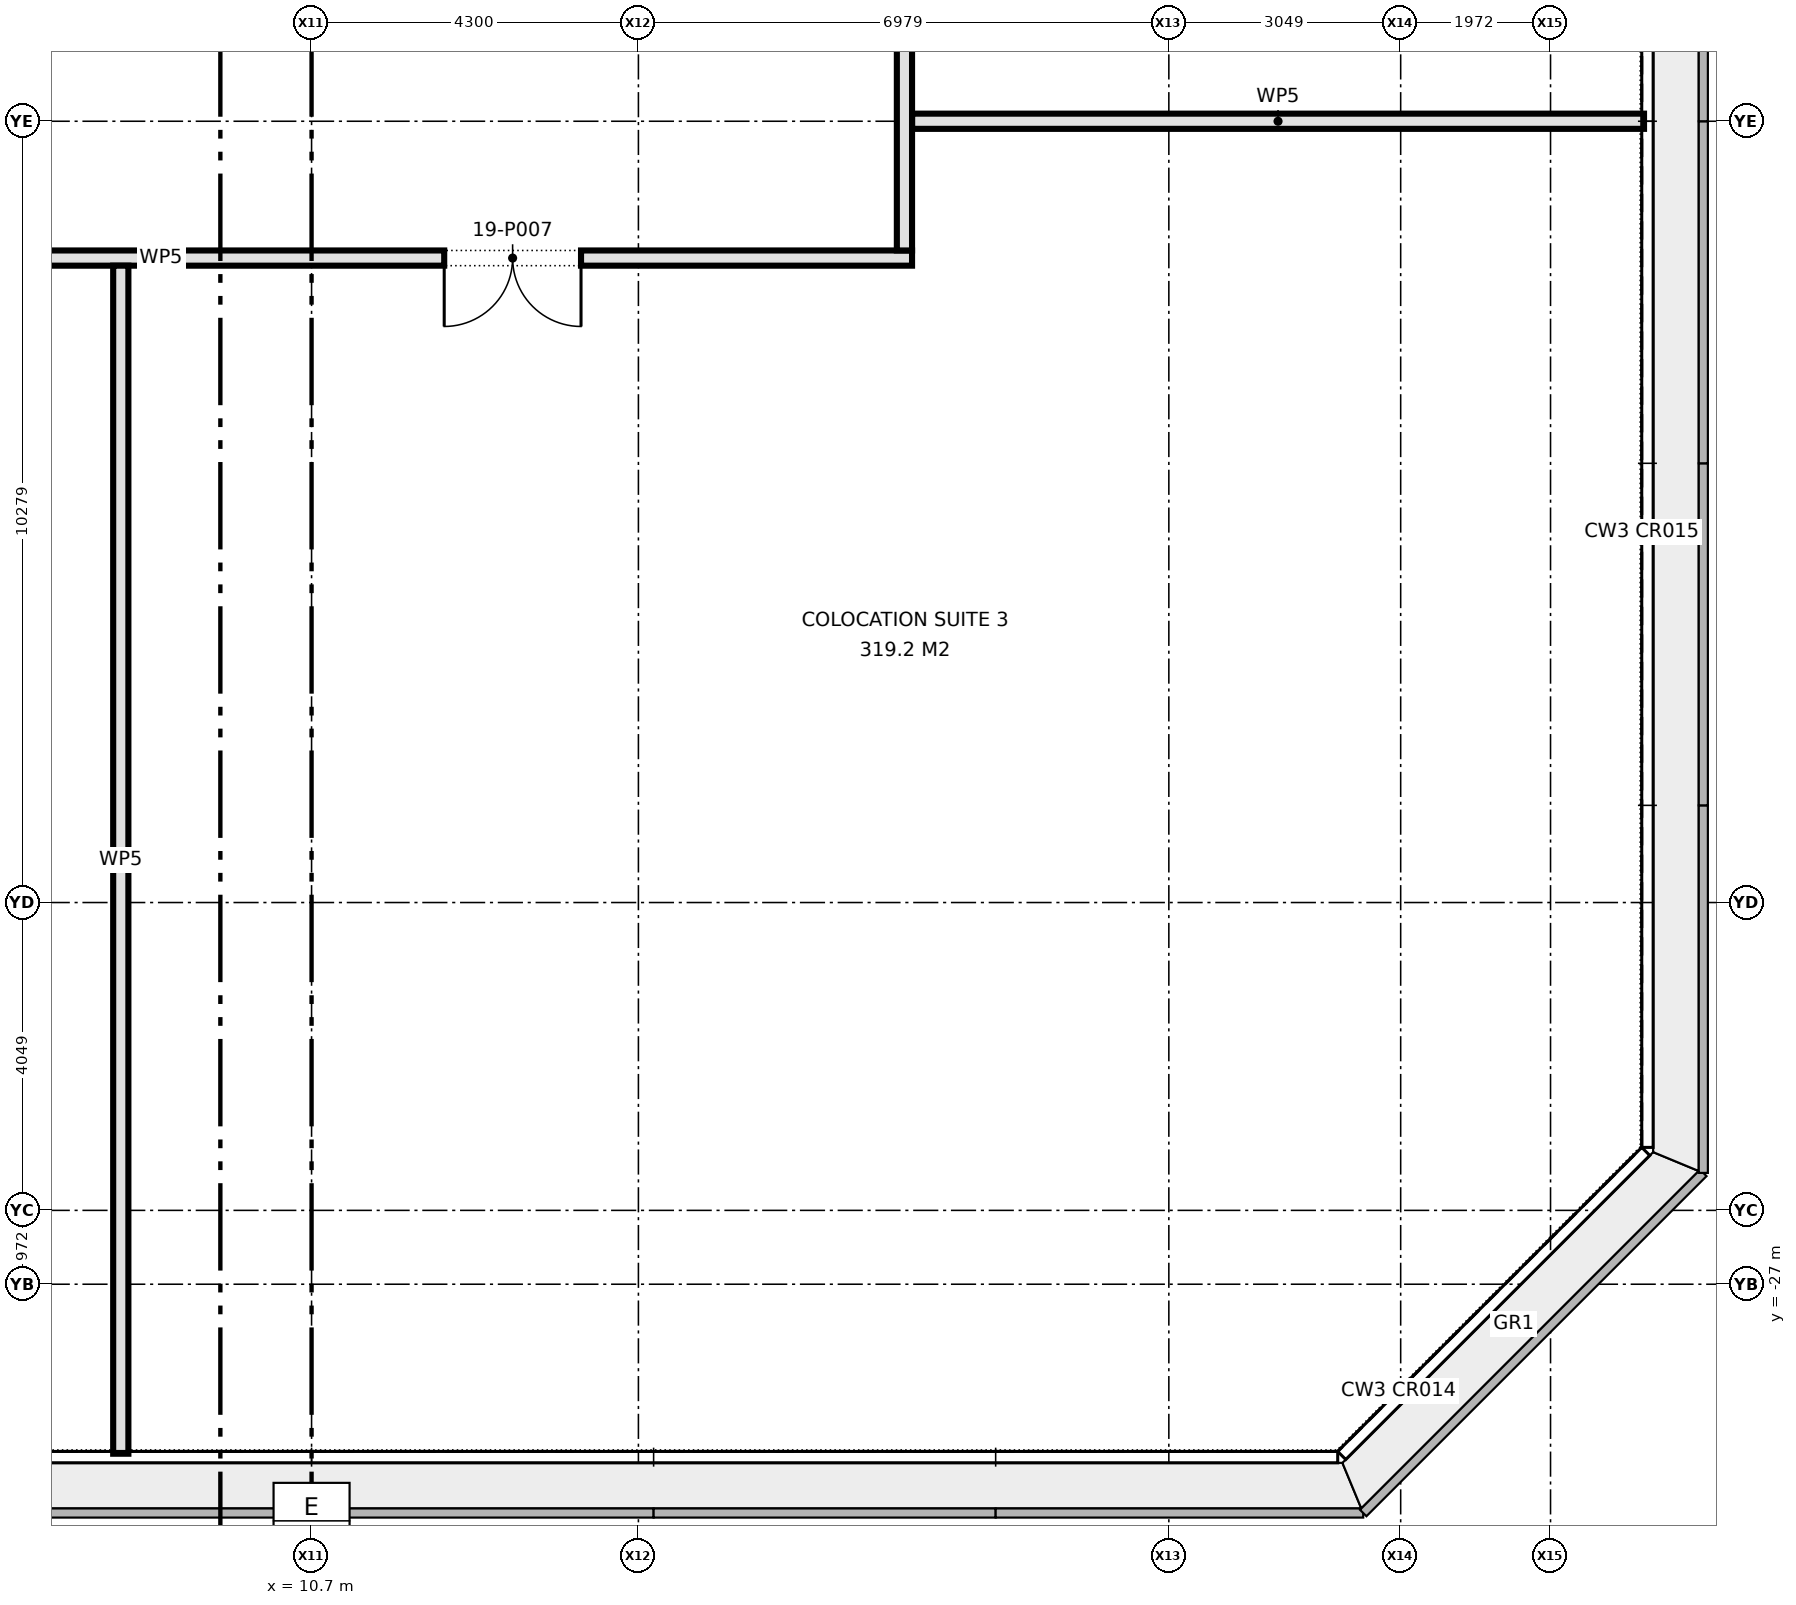
"""IFC4 building model, lengths in metres.
Left out: names, types, materials, properties, quantities, classifications, styles, units other than length and angle.
Written with IfcOpenShell. Run it as: python <this file> out.ifc"""

import sys

from ifc_helpers import new_model, si_unit, direction, frame, frame_2d, origin, place, context, subcontext, project, spatial, rectangle, extrude, element, fill, save


model = new_model("IFC4")
c1 = context("Model", 3, precision=1e-05, world=origin(), true_north=direction((0.0, 1.0)))
c2 = subcontext(c1, "Body", "Model", "MODEL_VIEW")
j1 = project(units=[si_unit("LENGTHUNIT", "METRE"), si_unit("PLANEANGLEUNIT", "RADIAN")], contexts=[c1])
p1 = place(None, origin())
s1 = spatial("IfcSite", under=j1, at=p1, CompositionType="ELEMENT")
p2 = place(p1, origin())
s2 = spatial("IfcBuilding", under=s1, at=p2, CompositionType="ELEMENT")
p3 = place(p2, frame((0.0, 0.0, 86.4)))
s3 = spatial("IfcBuildingStorey", under=s2, at=p3, CompositionType="ELEMENT", Elevation=86.4)
p4 = place(p3, frame((-18.6, -13.5, 0.0), z_axis=(0.0, 0.0, 1.0), x_axis=(1.0, 0.0, 0.0)))
e1 = element("IfcWall", 1, at=p4, inside=s3, PredefinedType="PARTITIONING", context=c2, shape_type="SweptSolid", body=[
    extrude(rectangle(XDim=37.2, YDim=0.2, at=frame_2d((18.6, 0.0))), origin(), (0.0, 0.0, 1.0), 4.2),
])
p5 = place(p4, frame((2.55, 0.0, 0.0)))
e2 = element("IfcOpeningElement", 2, at=p5, cuts=e1, PredefinedType="OPENING", context=c2, shape_type="SweptSolid", body=[
    extrude(rectangle(XDim=1.8, YDim=2.1, at=frame_2d((0.9, 1.05))), frame((0.0, 0.11, 0.0), z_axis=(0.0, -1.0, 0.0), x_axis=(1.0, 0.0, 0.0)), (0.0, 0.0, 1.0), 0.22),
])
p6 = place(p4, frame((21.795, 0.0, 0.0)))
e3 = element("IfcOpeningElement", 3, at=p6, cuts=e1, PredefinedType="OPENING", context=c2, shape_type="SweptSolid", body=[
    extrude(rectangle(XDim=1.8, YDim=2.1, at=frame_2d((0.9, 1.05))), frame((0.0, 0.11, 0.0), z_axis=(0.0, -1.0, 0.0), x_axis=(1.0, 0.0, 0.0)), (0.0, 0.0, 1.0), 0.22),
])
p7 = place(p4, frame((31.045, 0.0, 0.0)))
e4 = element("IfcOpeningElement", 4, at=p7, cuts=e1, PredefinedType="OPENING", context=c2, shape_type="SweptSolid", body=[
    extrude(rectangle(XDim=1.8, YDim=2.1, at=frame_2d((0.9, 1.05))), frame((0.0, 0.11, 0.0), z_axis=(0.0, -1.0, 0.0), x_axis=(1.0, 0.0, 0.0)), (0.0, 0.0, 1.0), 0.22),
])
p8 = place(p4, frame((8.0, 0.0, 0.0)))
e5 = element("IfcOpeningElement", 5, at=p8, cuts=e1, PredefinedType="OPENING", context=c2, shape_type="SweptSolid", body=[
    extrude(rectangle(XDim=1.2, YDim=2.1, at=frame_2d((0.6, 1.05))), frame((0.0, 0.11, 0.0), z_axis=(0.0, -1.0, 0.0), x_axis=(1.0, 0.0, 0.0)), (0.0, 0.0, 1.0), 0.22),
])
p9 = place(p4, frame((11.4, 0.0, 0.0)))
e6 = element("IfcOpeningElement", 6, at=p9, cuts=e1, PredefinedType="OPENING", context=c2, shape_type="SweptSolid", body=[
    extrude(rectangle(XDim=1.0, YDim=2.1, at=frame_2d((0.5, 1.05))), frame((0.0, 0.11, 0.0), z_axis=(0.0, -1.0, 0.0), x_axis=(1.0, 0.0, 0.0)), (0.0, 0.0, 1.0), 0.22),
])
p10 = place(p4, frame((14.4, 0.0, 0.0)))
e7 = element("IfcOpeningElement", 7, at=p10, cuts=e1, PredefinedType="OPENING", context=c2, shape_type="SweptSolid", body=[
    extrude(rectangle(XDim=1.0, YDim=2.1, at=frame_2d((0.5, 1.05))), frame((0.0, 0.11, 0.0), z_axis=(0.0, -1.0, 0.0), x_axis=(1.0, 0.0, 0.0)), (0.0, 0.0, 1.0), 0.22),
])
p11 = place(p4, frame((17.0, 0.0, 0.0)))
e8 = element("IfcOpeningElement", 8, at=p11, cuts=e1, PredefinedType="OPENING", context=c2, shape_type="SweptSolid", body=[
    extrude(rectangle(XDim=1.0, YDim=2.1, at=frame_2d((0.5, 1.05))), frame((0.0, 0.11, 0.0), z_axis=(0.0, -1.0, 0.0), x_axis=(1.0, 0.0, 0.0)), (0.0, 0.0, 1.0), 0.22),
])
p12 = place(p3, frame((18.6, -11.7, 0.0), z_axis=(0.0, 0.0, 1.0), x_axis=(1.0, 0.0, 0.0)))
e9 = element("IfcWall", 9, at=p12, inside=s3, PredefinedType="PARTITIONING", context=c2, shape_type="SweptSolid", body=[
    extrude(rectangle(XDim=9.63, YDim=0.2, at=frame_2d((4.815, 0.0))), origin(), (0.0, 0.0, 1.0), 4.2),
])
p13 = place(p3, frame((18.5, -13.4, 0.0), z_axis=(0.0, 0.0, 1.0), x_axis=(0.0, 1.0, 0.0)))
e10 = element("IfcWall", 10, at=p13, inside=s3, PredefinedType="PARTITIONING", context=c2, shape_type="SweptSolid", body=[
    extrude(rectangle(XDim=26.8, YDim=0.2, at=frame_2d((13.4, 0.0))), origin(), (0.0, 0.0, 1.0), 4.2),
])
p14 = place(p13, frame((5.6, 0.0, 0.0)))
e11 = element("IfcOpeningElement", 11, at=p14, cuts=e10, PredefinedType="OPENING", context=c2, shape_type="SweptSolid", body=[
    extrude(rectangle(XDim=1.2, YDim=2.1, at=frame_2d((0.6, 1.05))), frame((0.0, 0.11, 0.0), z_axis=(0.0, -1.0, 0.0), x_axis=(1.0, 0.0, 0.0)), (0.0, 0.0, 1.0), 0.22),
])
p15 = place(p13, frame((14.6, 0.0, 0.0)))
e12 = element("IfcOpeningElement", 12, at=p15, cuts=e10, PredefinedType="OPENING", context=c2, shape_type="SweptSolid", body=[
    extrude(rectangle(XDim=1.2, YDim=2.1, at=frame_2d((0.6, 1.05))), frame((0.0, 0.11, 0.0), z_axis=(0.0, -1.0, 0.0), x_axis=(1.0, 0.0, 0.0)), (0.0, 0.0, 1.0), 0.22),
])
p16 = place(p13, frame((21.05, 0.0, 0.0)))
e13 = element("IfcOpeningElement", 13, at=p16, cuts=e10, PredefinedType="OPENING", context=c2, shape_type="SweptSolid", body=[
    extrude(rectangle(XDim=1.8, YDim=2.1, at=frame_2d((0.9, 1.05))), frame((0.0, 0.11, 0.0), z_axis=(0.0, -1.0, 0.0), x_axis=(1.0, 0.0, 0.0)), (0.0, 0.0, 1.0), 0.22),
])
p17 = place(p3, frame((8.19, -29.23, 0.0), z_axis=(0.0, 0.0, 1.0), x_axis=(0.0, 1.0, 0.0)))
e14 = element("IfcWall", 14, at=p17, inside=s3, PredefinedType="PARTITIONING", context=c2, shape_type="SweptSolid", body=[
    extrude(rectangle(XDim=15.63, YDim=0.2, at=frame_2d((7.815, 0.0))), origin(), (0.0, 0.0, 1.0), 4.2),
])
p18 = place(p7, frame((1.8, 0.0, 0.0), z_axis=(0.0, 0.0, 1.0), x_axis=(-1.0, 0.0, 0.0)))
e15 = element("IfcDoor", 15, at=p18, inside=s3, OperationType="DOUBLE_DOOR_SINGLE_SWING", PredefinedType="DOOR", context=c2, shape_type="SweptSolid", body=[
    extrude(rectangle(XDim=1.8, YDim=2.1, at=frame_2d((0.9, 1.05))), frame((0.0, 0.025, 0.0), z_axis=(0.0, -1.0, 0.0), x_axis=(1.0, 0.0, 0.0)), (0.0, 0.0, 1.0), 0.05),
])
fill(e4, e15)
save(model, sys.argv[1])
